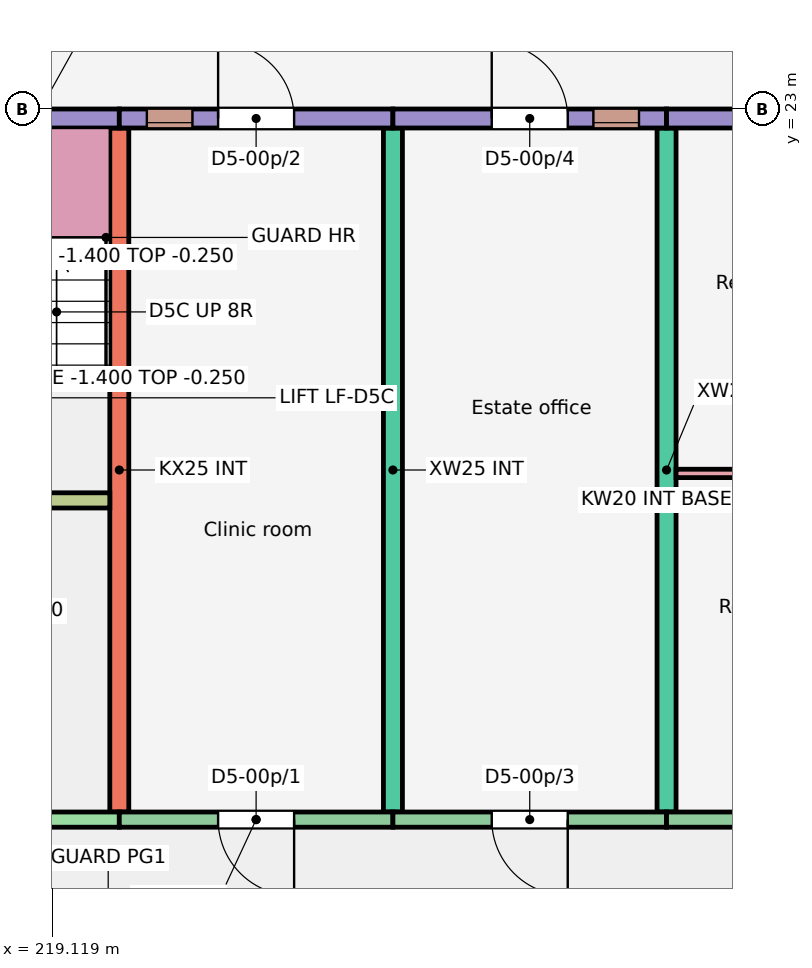
"""IFC4 building model, lengths in metres.
Left out: names, types, materials, properties, quantities, classifications, styles, units other than length and angle.
Written with IfcOpenShell. Run it as: python <this file> out.ifc"""

import sys

from ifc_helpers import new_model, si_unit, direction, frame, frame_2d, origin, place, context, subcontext, project, spatial, rectangle, extrude, element, fill, save


model = new_model("IFC4")
c1 = context("Model", 3, precision=1e-05, world=origin(), true_north=direction((0.0, 1.0)))
c2 = subcontext(c1, "Body", "Model", "MODEL_VIEW")
j1 = project(units=[si_unit("LENGTHUNIT", "METRE"), si_unit("PLANEANGLEUNIT", "RADIAN")], contexts=[c1])
p1 = place(None, origin())
s1 = spatial("IfcSite", under=j1, at=p1, CompositionType="ELEMENT")
p2 = place(p1, origin())
s2 = spatial("IfcBuilding", under=s1, at=p2, CompositionType="ELEMENT")
p3 = place(p2, origin())
s3 = spatial("IfcBuildingStorey", under=s2, at=p3, CompositionType="ELEMENT", Elevation=0.0)
for number, where, z_axis, x_axis in (
    (1, (220.0, 13.75, -0.25), (0.0, 0.0, 1.0), (0.0, 1.0, 0.0)),
    (2, (223.6, 13.75, -0.25), (0.0, 0.0, 1.0), (0.0, 1.0, 0.0)),
    (3, (227.2, 13.75, -0.25), (0.0, 0.0, 1.0), (0.0, 1.0, 0.0)),
):
    element("IfcWall", number, at=place(p3, frame(where, z_axis=z_axis, x_axis=x_axis)), inside=s3, PredefinedType="SHEAR", context=c2, shape_type="SweptSolid", body=[
        extrude(rectangle(XDim=9.0, YDim=0.25, at=frame_2d((4.5, 0.0))), origin(), (0.0, 0.0, 1.0), 3.25),
    ])
p4 = place(p3, frame((214.0, 22.875, -0.25), z_axis=(0.0, 0.0, 1.0), x_axis=(1.0, 0.0, 0.0)))
e4 = element("IfcWall", 4, at=p4, inside=s3, PredefinedType="SOLIDWALL", context=c2, shape_type="SweptSolid", body=[
    extrude(rectangle(XDim=6.0, YDim=0.25, at=frame_2d((3.0, 0.0))), origin(), (0.0, 0.0, 1.0), 3.25),
])
p5 = place(p4, frame((3.875, 0.0, 0.25)))
e5 = element("IfcOpeningElement", 5, at=p5, cuts=e4, PredefinedType="OPENING", context=c2, shape_type="SweptSolid", body=[
    extrude(rectangle(XDim=1.1, YDim=2.1, at=frame_2d((0.55, 1.05))), frame((0.0, 0.135, 0.0), z_axis=(0.0, -1.0, 0.0), x_axis=(1.0, 0.0, 0.0)), (0.0, 0.0, 1.0), 0.27),
])
p6 = place(p3, frame((214.15, 13.65, -0.25), z_axis=(0.0, 0.0, 1.0), x_axis=(1.0, 0.0, 0.0)))
e6 = element("IfcWall", 6, at=p6, inside=s3, PredefinedType="SHEAR", context=c2, shape_type="SweptSolid", body=[
    extrude(rectangle(XDim=5.85, YDim=0.2, at=frame_2d((2.925, 0.0))), origin(), (0.0, 0.0, 1.0), 3.25),
])
p7 = place(p6, frame((2.312, 0.0, 0.25)))
e7 = element("IfcOpeningElement", 7, at=p7, cuts=e6, PredefinedType="OPENING", context=c2, shape_type="SweptSolid", body=[
    extrude(rectangle(XDim=1.1, YDim=2.1, at=frame_2d((0.55, 1.05))), frame((0.0, 0.11, 0.0), z_axis=(0.0, -1.0, 0.0), x_axis=(1.0, 0.0, 0.0)), (0.0, 0.0, 1.0), 0.22),
])
p8 = place(p3, frame((214.15, 17.85, -0.25), z_axis=(0.0, 0.0, 1.0), x_axis=(1.0, 0.0, 0.0)))
e8 = element("IfcWall", 8, at=p8, inside=s3, PredefinedType="SHEAR", context=c2, shape_type="SweptSolid", body=[
    extrude(rectangle(XDim=5.725, YDim=0.2, at=frame_2d((2.863, 0.0))), origin(), (0.0, 0.0, 1.0), 3.25),
])
p9 = place(p8, frame((3.775, 0.0, 0.25)))
e9 = element("IfcOpeningElement", 9, at=p9, cuts=e8, PredefinedType="OPENING", context=c2, shape_type="SweptSolid", body=[
    extrude(rectangle(XDim=1.0, YDim=2.1, at=frame_2d((0.5, 1.05))), frame((0.0, 0.11, 0.0), z_axis=(0.0, -1.0, 0.0), x_axis=(1.0, 0.0, 0.0)), (0.0, 0.0, 1.0), 0.22),
])
p10 = place(p8, frame((0.762, 0.0, 0.25)))
e10 = element("IfcOpeningElement", 10, at=p10, cuts=e8, PredefinedType="OPENING", context=c2, shape_type="SweptSolid", body=[
    extrude(rectangle(XDim=1.1, YDim=2.1, at=frame_2d((0.55, 1.05))), frame((0.0, 0.11, 0.0), z_axis=(0.0, -1.0, 0.0), x_axis=(1.0, 0.0, 0.0)), (0.0, 0.0, 1.0), 0.22),
])
p11 = place(p3, frame((220.0, 22.875, -0.25), z_axis=(0.0, 0.0, 1.0), x_axis=(1.0, 0.0, 0.0)))
e11 = element("IfcWall", 11, at=p11, inside=s3, PredefinedType="SOLIDWALL", context=c2, shape_type="SweptSolid", body=[
    extrude(rectangle(XDim=3.6, YDim=0.25, at=frame_2d((1.8, 0.0))), origin(), (0.0, 0.0, 1.0), 3.25),
])
p12 = place(p11, frame((0.363, 0.0, 2.05)))
e12 = element("IfcOpeningElement", 12, at=p12, cuts=e11, PredefinedType="OPENING", context=c2, shape_type="SweptSolid", body=[
    extrude(rectangle(XDim=0.6, YDim=0.6, at=frame_2d((0.3, 0.3))), frame((0.0, 0.135, 0.0), z_axis=(0.0, -1.0, 0.0), x_axis=(1.0, 0.0, 0.0)), (0.0, 0.0, 1.0), 0.27),
])
p13 = place(p11, frame((1.3, 0.0, 0.25)))
e13 = element("IfcOpeningElement", 13, at=p13, cuts=e11, PredefinedType="OPENING", context=c2, shape_type="SweptSolid", body=[
    extrude(rectangle(XDim=1.0, YDim=2.1, at=frame_2d((0.5, 1.05))), frame((0.0, 0.135, 0.0), z_axis=(0.0, -1.0, 0.0), x_axis=(1.0, 0.0, 0.0)), (0.0, 0.0, 1.0), 0.27),
])
p14 = place(p3, frame((220.0, 13.65, -0.25), z_axis=(0.0, 0.0, 1.0), x_axis=(1.0, 0.0, 0.0)))
e14 = element("IfcWall", 14, at=p14, inside=s3, PredefinedType="SOLIDWALL", context=c2, shape_type="SweptSolid", body=[
    extrude(rectangle(XDim=3.6, YDim=0.2, at=frame_2d((1.8, 0.0))), origin(), (0.0, 0.0, 1.0), 3.25),
])
p15 = place(p14, frame((1.3, 0.0, 0.25)))
e15 = element("IfcOpeningElement", 15, at=p15, cuts=e14, PredefinedType="OPENING", context=c2, shape_type="SweptSolid", body=[
    extrude(rectangle(XDim=1.0, YDim=2.1, at=frame_2d((0.5, 1.05))), frame((0.0, 0.11, 0.0), z_axis=(0.0, -1.0, 0.0), x_axis=(1.0, 0.0, 0.0)), (0.0, 0.0, 1.0), 0.22),
])
p16 = place(p3, frame((223.6, 22.875, -0.25), z_axis=(0.0, 0.0, 1.0), x_axis=(1.0, 0.0, 0.0)))
e16 = element("IfcWall", 16, at=p16, inside=s3, PredefinedType="SOLIDWALL", context=c2, shape_type="SweptSolid", body=[
    extrude(rectangle(XDim=3.6, YDim=0.25, at=frame_2d((1.8, 0.0))), origin(), (0.0, 0.0, 1.0), 3.25),
])
p17 = place(p16, frame((2.637, 0.0, 2.05)))
e17 = element("IfcOpeningElement", 17, at=p17, cuts=e16, PredefinedType="OPENING", context=c2, shape_type="SweptSolid", body=[
    extrude(rectangle(XDim=0.6, YDim=0.6, at=frame_2d((0.3, 0.3))), frame((0.0, 0.135, 0.0), z_axis=(0.0, -1.0, 0.0), x_axis=(1.0, 0.0, 0.0)), (0.0, 0.0, 1.0), 0.27),
])
p18 = place(p16, frame((1.3, 0.0, 0.25)))
e18 = element("IfcOpeningElement", 18, at=p18, cuts=e16, PredefinedType="OPENING", context=c2, shape_type="SweptSolid", body=[
    extrude(rectangle(XDim=1.0, YDim=2.1, at=frame_2d((0.5, 1.05))), frame((0.0, 0.135, 0.0), z_axis=(0.0, -1.0, 0.0), x_axis=(1.0, 0.0, 0.0)), (0.0, 0.0, 1.0), 0.27),
])
p19 = place(p3, frame((223.6, 13.65, -0.25), z_axis=(0.0, 0.0, 1.0), x_axis=(1.0, 0.0, 0.0)))
e19 = element("IfcWall", 19, at=p19, inside=s3, PredefinedType="SOLIDWALL", context=c2, shape_type="SweptSolid", body=[
    extrude(rectangle(XDim=3.6, YDim=0.2, at=frame_2d((1.8, 0.0))), origin(), (0.0, 0.0, 1.0), 3.25),
])
p20 = place(p19, frame((1.3, 0.0, 0.25)))
e20 = element("IfcOpeningElement", 20, at=p20, cuts=e19, PredefinedType="OPENING", context=c2, shape_type="SweptSolid", body=[
    extrude(rectangle(XDim=1.0, YDim=2.1, at=frame_2d((0.5, 1.05))), frame((0.0, 0.11, 0.0), z_axis=(0.0, -1.0, 0.0), x_axis=(1.0, 0.0, 0.0)), (0.0, 0.0, 1.0), 0.22),
])
p21 = place(p3, frame((227.2, 22.875, -0.25), z_axis=(0.0, 0.0, 1.0), x_axis=(1.0, 0.0, 0.0)))
e21 = element("IfcWall", 21, at=p21, inside=s3, PredefinedType="SOLIDWALL", context=c2, shape_type="SweptSolid", body=[
    extrude(rectangle(XDim=3.6, YDim=0.25, at=frame_2d((1.8, 0.0))), origin(), (0.0, 0.0, 1.0), 3.25),
])
p22 = place(p21, frame((1.288, 0.0, 0.25)))
e22 = element("IfcOpeningElement", 22, at=p22, cuts=e21, PredefinedType="OPENING", context=c2, shape_type="SweptSolid", body=[
    extrude(rectangle(XDim=1.0, YDim=2.1, at=frame_2d((0.5, 1.05))), frame((0.0, 0.135, 0.0), z_axis=(0.0, -1.0, 0.0), x_axis=(1.0, 0.0, 0.0)), (0.0, 0.0, 1.0), 0.27),
])
p23 = place(p3, frame((227.2, 13.65, -0.25), z_axis=(0.0, 0.0, 1.0), x_axis=(1.0, 0.0, 0.0)))
e23 = element("IfcWall", 23, at=p23, inside=s3, PredefinedType="SOLIDWALL", context=c2, shape_type="SweptSolid", body=[
    extrude(rectangle(XDim=3.45, YDim=0.2, at=frame_2d((1.725, 0.0))), origin(), (0.0, 0.0, 1.0), 3.25),
])
p24 = place(p23, frame((1.288, 0.0, 0.25)))
e24 = element("IfcOpeningElement", 24, at=p24, cuts=e23, PredefinedType="OPENING", context=c2, shape_type="SweptSolid", body=[
    extrude(rectangle(XDim=1.0, YDim=2.1, at=frame_2d((0.5, 1.05))), frame((0.0, 0.11, 0.0), z_axis=(0.0, -1.0, 0.0), x_axis=(1.0, 0.0, 0.0)), (0.0, 0.0, 1.0), 0.22),
])
p25 = place(p3, frame((227.325, 18.205, 0.0), z_axis=(0.0, 0.0, 1.0), x_axis=(1.0, 0.0, 0.0)))
e25 = element("IfcWall", 25, at=p25, inside=s3, PredefinedType="PARTITIONING", context=c2, shape_type="SweptSolid", body=[
    extrude(rectangle(XDim=3.325, YDim=0.11, at=frame_2d((1.663, 0.0))), origin(), (0.0, 0.0, 1.0), 2.8),
])
p26 = place(p12, origin())
e26 = element("IfcWindow", 26, at=p26, inside=s3, PartitioningType="SINGLE_PANEL", PredefinedType="WINDOW", context=c2, shape_type="SweptSolid", body=[
    extrude(rectangle(XDim=0.6, YDim=0.6, at=frame_2d((0.3, 0.3))), frame((0.0, -0.025, 0.0), z_axis=(0.0, -1.0, 0.0), x_axis=(1.0, 0.0, 0.0)), (0.0, 0.0, 1.0), 0.06),
])
fill(e12, e26)
p27 = place(p17, origin())
e27 = element("IfcWindow", 27, at=p27, inside=s3, PartitioningType="SINGLE_PANEL", PredefinedType="WINDOW", context=c2, shape_type="SweptSolid", body=[
    extrude(rectangle(XDim=0.6, YDim=0.6, at=frame_2d((0.3, 0.3))), frame((0.0, -0.025, 0.0), z_axis=(0.0, -1.0, 0.0), x_axis=(1.0, 0.0, 0.0)), (0.0, 0.0, 1.0), 0.06),
])
fill(e17, e27)
p28 = place(p15, origin())
e28 = element("IfcDoor", 28, at=p28, inside=s3, OperationType="SINGLE_SWING_RIGHT", PredefinedType="DOOR", context=c2, shape_type="SweptSolid", body=[
    extrude(rectangle(XDim=1.0, YDim=2.1, at=frame_2d((0.5, 1.05))), frame((0.0, 0.025, 0.0), z_axis=(0.0, -1.0, 0.0), x_axis=(1.0, 0.0, 0.0)), (0.0, 0.0, 1.0), 0.05),
])
fill(e15, e28)
p29 = place(p13, origin())
e29 = element("IfcDoor", 29, at=p29, inside=s3, OperationType="SINGLE_SWING_LEFT", PredefinedType="DOOR", context=c2, shape_type="SweptSolid", body=[
    extrude(rectangle(XDim=1.0, YDim=2.1, at=frame_2d((0.5, 1.05))), frame((0.0, 0.025, 0.0), z_axis=(0.0, -1.0, 0.0), x_axis=(1.0, 0.0, 0.0)), (0.0, 0.0, 1.0), 0.05),
])
fill(e13, e29)
p30 = place(p20, origin())
e30 = element("IfcDoor", 30, at=p30, inside=s3, OperationType="SINGLE_SWING_RIGHT", PredefinedType="DOOR", context=c2, shape_type="SweptSolid", body=[
    extrude(rectangle(XDim=1.0, YDim=2.1, at=frame_2d((0.5, 1.05))), frame((0.0, 0.025, 0.0), z_axis=(0.0, -1.0, 0.0), x_axis=(1.0, 0.0, 0.0)), (0.0, 0.0, 1.0), 0.05),
])
fill(e20, e30)
p31 = place(p18, origin())
e31 = element("IfcDoor", 31, at=p31, inside=s3, OperationType="SINGLE_SWING_LEFT", PredefinedType="DOOR", context=c2, shape_type="SweptSolid", body=[
    extrude(rectangle(XDim=1.0, YDim=2.1, at=frame_2d((0.5, 1.05))), frame((0.0, 0.025, 0.0), z_axis=(0.0, -1.0, 0.0), x_axis=(1.0, 0.0, 0.0)), (0.0, 0.0, 1.0), 0.05),
])
fill(e18, e31)
save(model, sys.argv[1])
